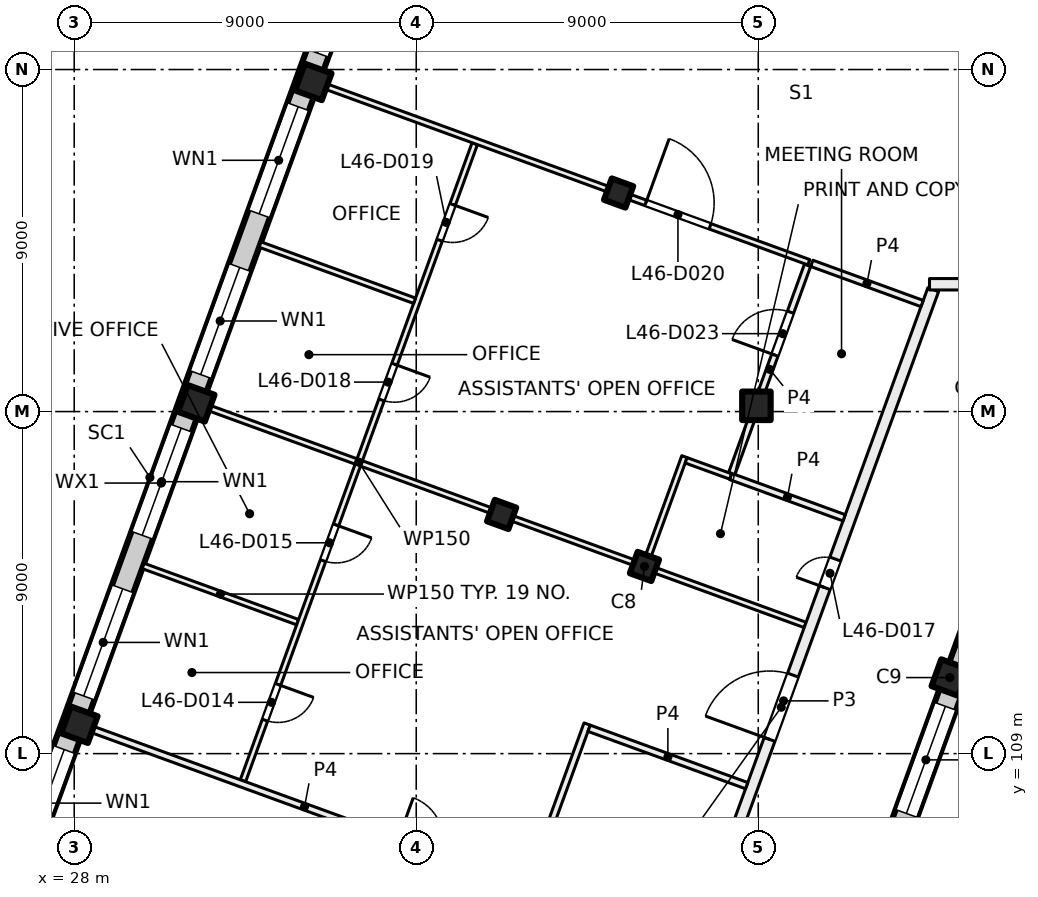
"""IFC4 building model, lengths in metres.
Left out: names, types, materials, properties, quantities, classifications, styles, units other than length and angle.
Written with IfcOpenShell. Run it as: python <this file> out.ifc"""

import sys

from ifc_helpers import new_model, si_unit, direction, frame, frame_2d, origin, origin_2d, place, context, subcontext, project, spatial, rectangle, extrude, element, fill, save


model = new_model("IFC4")
c1 = context("Model", 3, precision=1e-05, world=origin(), true_north=direction((0.0, 1.0)))
c2 = subcontext(c1, "Body", "Model", "MODEL_VIEW")
j1 = project(units=[si_unit("LENGTHUNIT", "METRE"), si_unit("PLANEANGLEUNIT", "RADIAN")], contexts=[c1])
p1 = place(None, origin())
s1 = spatial("IfcSite", under=j1, at=p1, CompositionType="ELEMENT")
p2 = place(p1, origin())
s2 = spatial("IfcBuilding", under=s1, at=p2, CompositionType="ELEMENT")
p3 = place(p2, frame((0.0, 0.0, 196.0)))
s3 = spatial("IfcBuildingStorey", under=s2, at=p3, CompositionType="ELEMENT", Elevation=196.0)
p4 = place(p3, frame((45.952, 118.152, 0.0), z_axis=(0.0, 0.0, 1.0), x_axis=(1.0, 0.0, 0.0)))
e1 = element("IfcColumn", 1, at=p4, inside=s3, PredefinedType="COLUMN", context=c2, shape_type="SweptSolid", body=[
    extrude(rectangle(XDim=0.75, YDim=0.75, at=origin_2d()), origin(), (0.0, 0.0, 1.0), 4.0),
])
for number, where, z_axis, x_axis in (
    (2, (43.006, 113.925, 0.0), (0.0, 0.0, 1.0), (-0.342, -0.94, 0.0)),
    (3, (42.325, 123.751, 0.0), (0.0, 0.0, 1.0), (-0.342, -0.94, 0.0)),
    (4, (39.247, 115.293, 0.0), (0.0, 0.0, 1.0), (-0.342, -0.94, 0.0)),
):
    element("IfcColumn", number, at=place(p3, frame(where, z_axis=z_axis, x_axis=x_axis)), inside=s3, PredefinedType="COLUMN", context=c2, shape_type="SweptSolid", body=[
        extrude(rectangle(XDim=0.6, YDim=0.6, at=origin_2d()), origin(), (0.0, 0.0, 1.0), 4.0),
    ])
for number, where, z_axis, x_axis in (
    (5, (51.04, 111.001, 0.0), (0.0, 0.0, 1.0), (-0.342, -0.94, 0.0)),
    (6, (34.291, 126.675, 0.0), (0.0, 0.0, 1.0), (-0.342, -0.94, 0.0)),
    (7, (31.212, 118.218, 0.0), (0.0, 0.0, 1.0), (-0.342, -0.94, 0.0)),
    (8, (28.134, 109.76, 0.0), (0.0, 0.0, 1.0), (-0.342, -0.94, 0.0)),
):
    element("IfcColumn", number, at=place(p3, frame(where, z_axis=z_axis, x_axis=x_axis)), inside=s3, PredefinedType="COLUMN", context=c2, shape_type="SweptSolid", body=[
        extrude(rectangle(XDim=0.75, YDim=0.75, at=origin_2d()), origin(), (0.0, 0.0, 1.0), 4.0),
    ])
p5 = place(p3, frame((52.212, 113.783, 0.0), z_axis=(0.0, 0.0, 1.0), x_axis=(-0.34202521188, -0.939690775968, 0.0)))
e9 = element("IfcWall", 9, at=p5, inside=s3, PredefinedType="SOLIDWALL", context=c2, shape_type="SweptSolid", body=[
    extrude(rectangle(XDim=21.745, YDim=0.6, at=frame_2d((10.873, 0.0))), origin(), (0.0, 0.0, 1.0), 3.625),
])
p6 = place(p5, frame((3.765, 0.0, 0.9)))
e10 = element("IfcOpeningElement", 10, at=p6, cuts=e9, PredefinedType="OPENING", context=c2, shape_type="SweptSolid", body=[
    extrude(rectangle(XDim=3.0, YDim=2.4, at=frame_2d((1.5, 1.2))), frame((0.0, 0.31, 0.0), z_axis=(0.0, -1.0, 0.0), x_axis=(1.0, 0.0, 0.0)), (0.0, 0.0, 1.0), 0.62),
])
p7 = place(p5, frame((8.265, 0.0, 0.9)))
e11 = element("IfcOpeningElement", 11, at=p7, cuts=e9, PredefinedType="OPENING", context=c2, shape_type="SweptSolid", body=[
    extrude(rectangle(XDim=3.0, YDim=2.4, at=frame_2d((1.5, 1.2))), frame((0.0, 0.31, 0.0), z_axis=(0.0, -1.0, 0.0), x_axis=(1.0, 0.0, 0.0)), (0.0, 0.0, 1.0), 0.62),
])
p8 = place(p5, frame((12.765, 0.0, 0.9)))
e12 = element("IfcOpeningElement", 12, at=p8, cuts=e9, PredefinedType="OPENING", context=c2, shape_type="SweptSolid", body=[
    extrude(rectangle(XDim=3.0, YDim=2.4, at=frame_2d((1.5, 1.2))), frame((0.0, 0.31, 0.0), z_axis=(0.0, -1.0, 0.0), x_axis=(1.0, 0.0, 0.0)), (0.0, 0.0, 1.0), 0.62),
])
p9 = place(p5, frame((17.265, 0.0, 0.9)))
e13 = element("IfcOpeningElement", 13, at=p9, cuts=e9, PredefinedType="OPENING", context=c2, shape_type="SweptSolid", body=[
    extrude(rectangle(XDim=3.0, YDim=2.4, at=frame_2d((1.5, 1.2))), frame((0.0, 0.31, 0.0), z_axis=(0.0, -1.0, 0.0), x_axis=(1.0, 0.0, 0.0)), (0.0, 0.0, 1.0), 0.62),
])
p10 = place(p3, frame((24.666, 100.669, 0.0), z_axis=(0.0, 0.0, 1.0), x_axis=(0.34201964167, 0.939692803373, 0.0)))
e14 = element("IfcWall", 14, at=p10, inside=s3, PredefinedType="SOLIDWALL", context=c2, shape_type="SweptSolid", body=[
    extrude(rectangle(XDim=32.884, YDim=0.6, at=frame_2d((16.442, 0.0))), origin(), (0.0, 0.0, 1.0), 3.625),
])
p11 = place(p10, frame((1.48, 0.0, 0.9)))
e15 = element("IfcOpeningElement", 15, at=p11, cuts=e14, PredefinedType="OPENING", context=c2, shape_type="SweptSolid", body=[
    extrude(rectangle(XDim=3.0, YDim=2.4, at=frame_2d((1.5, 1.2))), frame((0.0, 0.31, 0.0), z_axis=(0.0, -1.0, 0.0), x_axis=(1.0, 0.0, 0.0)), (0.0, 0.0, 1.0), 0.62),
])
p12 = place(p10, frame((5.98, 0.0, 0.9)))
e16 = element("IfcOpeningElement", 16, at=p12, cuts=e14, PredefinedType="OPENING", context=c2, shape_type="SweptSolid", body=[
    extrude(rectangle(XDim=3.0, YDim=2.4, at=frame_2d((1.5, 1.2))), frame((0.0, 0.31, 0.0), z_axis=(0.0, -1.0, 0.0), x_axis=(1.0, 0.0, 0.0)), (0.0, 0.0, 1.0), 0.62),
])
p13 = place(p10, frame((10.48, 0.0, 0.9)))
e17 = element("IfcOpeningElement", 17, at=p13, cuts=e14, PredefinedType="OPENING", context=c2, shape_type="SweptSolid", body=[
    extrude(rectangle(XDim=3.0, YDim=2.4, at=frame_2d((1.5, 1.2))), frame((0.0, 0.31, 0.0), z_axis=(0.0, -1.0, 0.0), x_axis=(1.0, 0.0, 0.0)), (0.0, 0.0, 1.0), 0.62),
])
p14 = place(p10, frame((14.98, 0.0, 0.9)))
e18 = element("IfcOpeningElement", 18, at=p14, cuts=e14, PredefinedType="OPENING", context=c2, shape_type="SweptSolid", body=[
    extrude(rectangle(XDim=3.0, YDim=2.4, at=frame_2d((1.5, 1.2))), frame((0.0, 0.31, 0.0), z_axis=(0.0, -1.0, 0.0), x_axis=(1.0, 0.0, 0.0)), (0.0, 0.0, 1.0), 0.62),
])
p15 = place(p10, frame((19.48, 0.0, 0.9)))
e19 = element("IfcOpeningElement", 19, at=p15, cuts=e14, PredefinedType="OPENING", context=c2, shape_type="SweptSolid", body=[
    extrude(rectangle(XDim=3.0, YDim=2.4, at=frame_2d((1.5, 1.2))), frame((0.0, 0.31, 0.0), z_axis=(0.0, -1.0, 0.0), x_axis=(1.0, 0.0, 0.0)), (0.0, 0.0, 1.0), 0.62),
])
p16 = place(p10, frame((23.98, 0.0, 0.9)))
e20 = element("IfcOpeningElement", 20, at=p16, cuts=e14, PredefinedType="OPENING", context=c2, shape_type="SweptSolid", body=[
    extrude(rectangle(XDim=3.0, YDim=2.4, at=frame_2d((1.5, 1.2))), frame((0.0, 0.31, 0.0), z_axis=(0.0, -1.0, 0.0), x_axis=(1.0, 0.0, 0.0)), (0.0, 0.0, 1.0), 0.62),
])
p17 = place(p10, frame((28.48, 0.0, 0.9)))
e21 = element("IfcOpeningElement", 21, at=p17, cuts=e14, PredefinedType="OPENING", context=c2, shape_type="SweptSolid", body=[
    extrude(rectangle(XDim=3.0, YDim=2.4, at=frame_2d((1.5, 1.2))), frame((0.0, 0.31, 0.0), z_axis=(0.0, -1.0, 0.0), x_axis=(1.0, 0.0, 0.0)), (0.0, 0.0, 1.0), 0.62),
])
p18 = place(p3, frame((29.814, 113.938, 0.0), z_axis=(0.0, 0.0, 1.0), x_axis=(0.93973078783, -0.341915262023, 0.0)))
e22 = element("IfcWall", 22, at=p18, inside=s3, PredefinedType="PARTITIONING", context=c2, shape_type="SweptSolid", body=[
    extrude(rectangle(XDim=4.326, YDim=0.15, at=frame_2d((2.163, 0.0))), origin(), (0.0, 0.0, 1.0), 3.625),
])
p19 = place(p3, frame((31.353, 118.166, 0.0), z_axis=(0.0, 0.0, 1.0), x_axis=(0.939695108427, -0.342013308511, 0.0)))
e23 = element("IfcWall", 23, at=p19, inside=s3, PredefinedType="PARTITIONING", context=c2, shape_type="SweptSolid", body=[
    extrude(rectangle(XDim=16.9, YDim=0.15, at=frame_2d((8.45, 0.0))), origin(), (0.0, 0.0, 1.0), 3.625),
])
p20 = place(p3, frame((38.54, 125.049, 0.0), z_axis=(0.0, 0.0, 1.0), x_axis=(-0.341960632782, -0.939714278719, 0.0)))
e24 = element("IfcWall", 24, at=p20, inside=s3, PredefinedType="PARTITIONING", context=c2, shape_type="SweptSolid", body=[
    extrude(rectangle(XDim=17.839, YDim=0.15, at=frame_2d((8.919, 0.0))), origin(), (0.0, 0.0, 1.0), 3.625),
])
p21 = place(p20, frame((15.142, 0.0, 0.0)))
e25 = element("IfcOpeningElement", 25, at=p21, cuts=e24, PredefinedType="OPENING", context=c2, shape_type="SweptSolid", body=[
    extrude(rectangle(XDim=1.0, YDim=2.1, at=frame_2d((0.5, 1.05))), frame((0.0, 0.085, 0.0), z_axis=(0.0, -1.0, 0.0), x_axis=(1.0, 0.0, 0.0)), (0.0, 0.0, 1.0), 0.17),
])
p22 = place(p20, frame((10.675, 0.0, 0.0)))
e26 = element("IfcOpeningElement", 26, at=p22, cuts=e24, PredefinedType="OPENING", context=c2, shape_type="SweptSolid", body=[
    extrude(rectangle(XDim=1.0, YDim=2.1, at=frame_2d((0.5, 1.05))), frame((0.0, 0.085, 0.0), z_axis=(0.0, -1.0, 0.0), x_axis=(1.0, 0.0, 0.0)), (0.0, 0.0, 1.0), 0.17),
])
p23 = place(p20, frame((6.176, 0.0, 0.0)))
e27 = element("IfcOpeningElement", 27, at=p23, cuts=e24, PredefinedType="OPENING", context=c2, shape_type="SweptSolid", body=[
    extrude(rectangle(XDim=1.0, YDim=2.1, at=frame_2d((0.5, 1.05))), frame((0.0, 0.085, 0.0), z_axis=(0.0, -1.0, 0.0), x_axis=(1.0, 0.0, 0.0)), (0.0, 0.0, 1.0), 0.17),
])
p24 = place(p20, frame((1.703, 0.0, 0.0)))
e28 = element("IfcOpeningElement", 28, at=p24, cuts=e24, PredefinedType="OPENING", context=c2, shape_type="SweptSolid", body=[
    extrude(rectangle(XDim=1.0, YDim=2.1, at=frame_2d((0.5, 1.05))), frame((0.0, 0.085, 0.0), z_axis=(0.0, -1.0, 0.0), x_axis=(1.0, 0.0, 0.0)), (0.0, 0.0, 1.0), 0.17),
])
p25 = place(p3, frame((32.892, 122.395, 0.0), z_axis=(0.0, 0.0, 1.0), x_axis=(0.93973078783, -0.341915262023, 0.0)))
e29 = element("IfcWall", 29, at=p25, inside=s3, PredefinedType="PARTITIONING", context=c2, shape_type="SweptSolid", body=[
    extrude(rectangle(XDim=4.326, YDim=0.15, at=frame_2d((2.163, 0.0))), origin(), (0.0, 0.0, 1.0), 3.625),
])
p26 = place(p3, frame((34.431, 126.624, 0.0), z_axis=(0.0, 0.0, 1.0), x_axis=(0.939689004313, -0.34203007934, 0.0)))
e30 = element("IfcWall", 30, at=p26, inside=s3, PredefinedType="PARTITIONING", context=c2, shape_type="SweptSolid", body=[
    extrude(rectangle(XDim=13.727, YDim=0.15, at=frame_2d((6.864, 0.0))), origin(), (0.0, 0.0, 1.0), 3.625),
])
p27 = place(p26, frame((9.162, 0.0, 0.0)))
e31 = element("IfcOpeningElement", 31, at=p27, cuts=e30, PredefinedType="OPENING", context=c2, shape_type="SweptSolid", body=[
    extrude(rectangle(XDim=1.8, YDim=2.1, at=frame_2d((0.9, 1.05))), frame((0.0, 0.085, 0.0), z_axis=(0.0, -1.0, 0.0), x_axis=(1.0, 0.0, 0.0)), (0.0, 0.0, 1.0), 0.17),
])
p28 = place(p3, frame((38.418, 101.321, 0.0), z_axis=(0.0, 0.0, 1.0), x_axis=(0.342082778631, 0.939669821035, 0.0)))
e32 = element("IfcWall", 32, at=p28, inside=s3, PredefinedType="PARTITIONING", context=c2, shape_type="SweptSolid", body=[
    extrude(rectangle(XDim=9.001, YDim=0.175, at=frame_2d((4.5, 0.0))), origin(), (0.0, 0.0, 1.0), 3.625),
])
p29 = place(p3, frame((28.275, 109.709, 0.0), z_axis=(0.0, 0.0, 1.0), x_axis=(0.939707717516, -0.341978662553, 0.0)))
e33 = element("IfcWall", 33, at=p29, inside=s3, PredefinedType="PARTITIONING", context=c2, shape_type="SweptSolid", body=[
    extrude(rectangle(XDim=12.313, YDim=0.175, at=frame_2d((6.157, 0.0))), origin(), (0.0, 0.0, 1.0), 3.625),
])
p30 = place(p29, frame((8.765, 0.0, 0.0)))
e34 = element("IfcOpeningElement", 34, at=p30, cuts=e33, PredefinedType="OPENING", context=c2, shape_type="SweptSolid", body=[
    extrude(rectangle(XDim=1.2, YDim=2.1, at=frame_2d((0.6, 1.05))), frame((0.0, 0.097, 0.0), z_axis=(0.0, -1.0, 0.0), x_axis=(1.0, 0.0, 0.0)), (0.0, 0.0, 1.0), 0.195),
])
p31 = place(p3, frame((42.728, 99.567, 0.0), z_axis=(0.0, 0.0, 1.0), x_axis=(0.342015412648, 0.939694342598, 0.0)))
e35 = element("IfcWall", 35, at=p31, inside=s3, PredefinedType="PARTITIONING", context=c2, shape_type="SweptSolid", body=[
    extrude(rectangle(XDim=23.031, YDim=0.3, at=frame_2d((11.516, 0.0))), origin(), (0.0, 0.0, 1.0), 3.625),
])
p32 = place(p31, frame((3.987, 0.0, 0.0)))
e36 = element("IfcOpeningElement", 36, at=p32, cuts=e35, PredefinedType="OPENING", context=c2, shape_type="SweptSolid", body=[
    extrude(rectangle(XDim=1.2, YDim=2.1, at=frame_2d((0.6, 1.05))), frame((0.0, 0.16, 0.0), z_axis=(0.0, -1.0, 0.0), x_axis=(1.0, 0.0, 0.0)), (0.0, 0.0, 1.0), 0.32),
])
p33 = place(p31, frame((10.437, 0.0, 0.0)))
e37 = element("IfcOpeningElement", 37, at=p33, cuts=e35, PredefinedType="OPENING", context=c2, shape_type="SweptSolid", body=[
    extrude(rectangle(XDim=1.8, YDim=2.1, at=frame_2d((0.9, 1.05))), frame((0.0, 0.16, 0.0), z_axis=(0.0, -1.0, 0.0), x_axis=(1.0, 0.0, 0.0)), (0.0, 0.0, 1.0), 0.32),
])
p34 = place(p31, frame((14.687, 0.0, 0.0)))
e38 = element("IfcOpeningElement", 38, at=p34, cuts=e35, PredefinedType="OPENING", context=c2, shape_type="SweptSolid", body=[
    extrude(rectangle(XDim=0.8, YDim=2.1, at=frame_2d((0.4, 1.05))), frame((0.0, 0.16, 0.0), z_axis=(0.0, -1.0, 0.0), x_axis=(1.0, 0.0, 0.0)), (0.0, 0.0, 1.0), 0.32),
])
p35 = place(p3, frame((44.058, 116.814, 0.0), z_axis=(0.0, 0.0, 1.0), x_axis=(-0.342063238742, -0.939676934218, 0.0)))
e39 = element("IfcWall", 39, at=p35, inside=s3, PredefinedType="PARTITIONING", context=c2, shape_type="SweptSolid", body=[
    extrude(rectangle(XDim=3.0, YDim=0.15, at=frame_2d((1.5, 0.0))), origin(), (0.0, 0.0, 1.0), 3.625),
])
p36 = place(p3, frame((45.275, 116.292, 0.0), z_axis=(0.0, 0.0, 1.0), x_axis=(-0.93991332754, 0.341413146661, 0.0)))
e40 = element("IfcWall", 40, at=p36, inside=s3, PredefinedType="PARTITIONING", context=c2, shape_type="SweptSolid", body=[
    extrude(rectangle(XDim=1.248, YDim=0.15, at=frame_2d((0.624, 0.0))), origin(), (0.0, 0.0, 1.0), 3.625),
])
p37 = place(p3, frame((45.275, 116.292, 0.0), z_axis=(0.0, 0.0, 1.0), x_axis=(0.939649736865, -0.342137942956, 0.0)))
e41 = element("IfcWall", 41, at=p37, inside=s3, PredefinedType="PARTITIONING", context=c2, shape_type="SweptSolid", body=[
    extrude(rectangle(XDim=3.177, YDim=0.175, at=frame_2d((1.588, 0.0))), origin(), (0.0, 0.0, 1.0), 3.625),
])
p38 = place(p3, frame((45.695, 108.157, 0.0), z_axis=(0.0, 0.0, 1.0), x_axis=(-0.939620446327, 0.342218375959, 0.0)))
e42 = element("IfcWall", 42, at=p38, inside=s3, PredefinedType="PARTITIONING", context=c2, shape_type="SweptSolid", body=[
    extrude(rectangle(XDim=4.412, YDim=0.175, at=frame_2d((2.206, 0.0))), origin(), (0.0, 0.0, 1.0), 3.625),
])
p39 = place(p3, frame((45.305, 116.374, 0.0), z_axis=(0.0, 0.0, 1.0), x_axis=(0.341998803079, 0.939700387726, 0.0)))
e43 = element("IfcWall", 43, at=p39, inside=s3, PredefinedType="PARTITIONING", context=c2, shape_type="SweptSolid", body=[
    extrude(rectangle(XDim=5.825, YDim=0.175, at=frame_2d((2.913, 0.0))), origin(), (0.0, 0.0, 1.0), 3.625),
])
p40 = place(p39, frame((3.312, 0.0, 0.0)))
e44 = element("IfcOpeningElement", 44, at=p40, cuts=e43, PredefinedType="OPENING", context=c2, shape_type="SweptSolid", body=[
    extrude(rectangle(XDim=1.2, YDim=2.1, at=frame_2d((0.6, 1.05))), frame((0.0, 0.097, 0.0), z_axis=(0.0, -1.0, 0.0), x_axis=(1.0, 0.0, 0.0)), (0.0, 0.0, 1.0), 0.195),
])
p41 = place(p3, frame((50.312, 120.843, 0.0), z_axis=(0.0, 0.0, 1.0), x_axis=(-0.939666459913, 0.342092011182, 0.0)))
e45 = element("IfcWall", 45, at=p41, inside=s3, PredefinedType="PARTITIONING", context=c2, shape_type="SweptSolid", body=[
    extrude(rectangle(XDim=3.089, YDim=0.175, at=frame_2d((1.545, 0.0))), origin(), (0.0, 0.0, 1.0), 3.625),
])
p42 = place(p3, frame((50.506, 121.35, 0.0), z_axis=(0.0, 0.0, 1.0), x_axis=(1.0, 0.0, 0.0)))
e46 = element("IfcWall", 46, at=p42, inside=s3, PredefinedType="PARTITIONING", context=c2, shape_type="SweptSolid", body=[
    extrude(rectangle(XDim=35.319, YDim=0.3, at=frame_2d((17.659, 0.0))), origin(), (0.0, 0.0, 1.0), 3.625),
])
p43 = place(p42, frame((21.244, 0.0, 0.0)))
e47 = element("IfcOpeningElement", 47, at=p43, cuts=e46, PredefinedType="OPENING", context=c2, shape_type="SweptSolid", body=[
    extrude(rectangle(XDim=1.0, YDim=2.1, at=frame_2d((0.5, 1.05))), frame((0.0, 0.16, 0.0), z_axis=(0.0, -1.0, 0.0), x_axis=(1.0, 0.0, 0.0)), (0.0, 0.0, 1.0), 0.32),
])
p44 = place(p42, frame((29.844, 0.0, 0.0)))
e48 = element("IfcOpeningElement", 48, at=p44, cuts=e46, PredefinedType="OPENING", context=c2, shape_type="SweptSolid", body=[
    extrude(rectangle(XDim=1.8, YDim=2.1, at=frame_2d((0.9, 1.05))), frame((0.0, 0.16, 0.0), z_axis=(0.0, -1.0, 0.0), x_axis=(1.0, 0.0, 0.0)), (0.0, 0.0, 1.0), 0.32),
])
p45 = place(p42, frame((9.594, 0.0, 0.0)))
e49 = element("IfcOpeningElement", 49, at=p45, cuts=e46, PredefinedType="OPENING", context=c2, shape_type="SweptSolid", body=[
    extrude(rectangle(XDim=1.8, YDim=2.1, at=frame_2d((0.9, 1.05))), frame((0.0, 0.16, 0.0), z_axis=(0.0, -1.0, 0.0), x_axis=(1.0, 0.0, 0.0)), (0.0, 0.0, 1.0), 0.32),
])
p46 = place(p42, frame((1.047, 0.0, 0.0)))
e50 = element("IfcOpeningElement", 50, at=p46, cuts=e46, PredefinedType="OPENING", context=c2, shape_type="SweptSolid", body=[
    extrude(rectangle(XDim=1.8, YDim=2.1, at=frame_2d((0.9, 1.05))), frame((0.0, 0.16, 0.0), z_axis=(0.0, -1.0, 0.0), x_axis=(1.0, 0.0, 0.0)), (0.0, 0.0, 1.0), 0.32),
])
p47 = place(p6, origin())
e51 = element("IfcWindow", 51, at=p47, inside=s3, PartitioningType="SINGLE_PANEL", PredefinedType="WINDOW", context=c2, shape_type="SweptSolid", body=[
    extrude(rectangle(XDim=3.0, YDim=2.4, at=frame_2d((1.5, 1.2))), frame((0.0, 0.03, 0.0), z_axis=(0.0, -1.0, 0.0), x_axis=(1.0, 0.0, 0.0)), (0.0, 0.0, 1.0), 0.06),
])
fill(e10, e51)
p48 = place(p12, origin())
e52 = element("IfcWindow", 52, at=p48, inside=s3, PartitioningType="SINGLE_PANEL", PredefinedType="WINDOW", context=c2, shape_type="SweptSolid", body=[
    extrude(rectangle(XDim=3.0, YDim=2.4, at=frame_2d((1.5, 1.2))), frame((0.0, 0.03, 0.0), z_axis=(0.0, -1.0, 0.0), x_axis=(1.0, 0.0, 0.0)), (0.0, 0.0, 1.0), 0.06),
])
fill(e16, e52)
p49 = place(p13, origin())
e53 = element("IfcWindow", 53, at=p49, inside=s3, PartitioningType="SINGLE_PANEL", PredefinedType="WINDOW", context=c2, shape_type="SweptSolid", body=[
    extrude(rectangle(XDim=3.0, YDim=2.4, at=frame_2d((1.5, 1.2))), frame((0.0, 0.03, 0.0), z_axis=(0.0, -1.0, 0.0), x_axis=(1.0, 0.0, 0.0)), (0.0, 0.0, 1.0), 0.06),
])
fill(e17, e53)
p50 = place(p14, origin())
e54 = element("IfcWindow", 54, at=p50, inside=s3, PartitioningType="SINGLE_PANEL", PredefinedType="WINDOW", context=c2, shape_type="SweptSolid", body=[
    extrude(rectangle(XDim=3.0, YDim=2.4, at=frame_2d((1.5, 1.2))), frame((0.0, 0.03, 0.0), z_axis=(0.0, -1.0, 0.0), x_axis=(1.0, 0.0, 0.0)), (0.0, 0.0, 1.0), 0.06),
])
fill(e18, e54)
p51 = place(p15, origin())
e55 = element("IfcWindow", 55, at=p51, inside=s3, PartitioningType="SINGLE_PANEL", PredefinedType="WINDOW", context=c2, shape_type="SweptSolid", body=[
    extrude(rectangle(XDim=3.0, YDim=2.4, at=frame_2d((1.5, 1.2))), frame((0.0, 0.03, 0.0), z_axis=(0.0, -1.0, 0.0), x_axis=(1.0, 0.0, 0.0)), (0.0, 0.0, 1.0), 0.06),
])
fill(e19, e55)
p52 = place(p16, origin())
e56 = element("IfcWindow", 56, at=p52, inside=s3, PartitioningType="SINGLE_PANEL", PredefinedType="WINDOW", context=c2, shape_type="SweptSolid", body=[
    extrude(rectangle(XDim=3.0, YDim=2.4, at=frame_2d((1.5, 1.2))), frame((0.0, 0.03, 0.0), z_axis=(0.0, -1.0, 0.0), x_axis=(1.0, 0.0, 0.0)), (0.0, 0.0, 1.0), 0.06),
])
fill(e20, e56)
p53 = place(p17, origin())
e57 = element("IfcWindow", 57, at=p53, inside=s3, PartitioningType="SINGLE_PANEL", PredefinedType="WINDOW", context=c2, shape_type="SweptSolid", body=[
    extrude(rectangle(XDim=3.0, YDim=2.4, at=frame_2d((1.5, 1.2))), frame((0.0, 0.03, 0.0), z_axis=(0.0, -1.0, 0.0), x_axis=(1.0, 0.0, 0.0)), (0.0, 0.0, 1.0), 0.06),
])
fill(e21, e57)
p54 = place(p21, origin())
e58 = element("IfcDoor", 58, at=p54, inside=s3, OperationType="SINGLE_SWING_LEFT", PredefinedType="DOOR", context=c2, shape_type="SweptSolid", body=[
    extrude(rectangle(XDim=1.0, YDim=2.1, at=frame_2d((0.5, 1.05))), frame((0.0, 0.025, 0.0), z_axis=(0.0, -1.0, 0.0), x_axis=(1.0, 0.0, 0.0)), (0.0, 0.0, 1.0), 0.05),
])
fill(e25, e58)
p55 = place(p22, origin())
e59 = element("IfcDoor", 59, at=p55, inside=s3, OperationType="SINGLE_SWING_LEFT", PredefinedType="DOOR", context=c2, shape_type="SweptSolid", body=[
    extrude(rectangle(XDim=1.0, YDim=2.1, at=frame_2d((0.5, 1.05))), frame((0.0, 0.025, 0.0), z_axis=(0.0, -1.0, 0.0), x_axis=(1.0, 0.0, 0.0)), (0.0, 0.0, 1.0), 0.05),
])
fill(e26, e59)
p56 = place(p33, origin())
e60 = element("IfcDoor", 60, at=p56, inside=s3, OperationType="DOUBLE_DOOR_SINGLE_SWING", PredefinedType="DOOR", context=c2, shape_type="SweptSolid", body=[
    extrude(rectangle(XDim=1.8, YDim=2.1, at=frame_2d((0.9, 1.05))), frame((0.0, 0.025, 0.0), z_axis=(0.0, -1.0, 0.0), x_axis=(1.0, 0.0, 0.0)), (0.0, 0.0, 1.0), 0.05),
])
fill(e37, e60)
p57 = place(p34, origin())
e61 = element("IfcDoor", 61, at=p57, inside=s3, OperationType="SINGLE_SWING_LEFT", PredefinedType="DOOR", context=c2, shape_type="SweptSolid", body=[
    extrude(rectangle(XDim=0.8, YDim=2.1, at=frame_2d((0.4, 1.05))), frame((0.0, 0.025, 0.0), z_axis=(0.0, -1.0, 0.0), x_axis=(1.0, 0.0, 0.0)), (0.0, 0.0, 1.0), 0.05),
])
fill(e38, e61)
p58 = place(p23, origin())
e62 = element("IfcDoor", 62, at=p58, inside=s3, OperationType="SINGLE_SWING_LEFT", PredefinedType="DOOR", context=c2, shape_type="SweptSolid", body=[
    extrude(rectangle(XDim=1.0, YDim=2.1, at=frame_2d((0.5, 1.05))), frame((0.0, 0.025, 0.0), z_axis=(0.0, -1.0, 0.0), x_axis=(1.0, 0.0, 0.0)), (0.0, 0.0, 1.0), 0.05),
])
fill(e27, e62)
p59 = place(p24, origin())
e63 = element("IfcDoor", 63, at=p59, inside=s3, OperationType="SINGLE_SWING_LEFT", PredefinedType="DOOR", context=c2, shape_type="SweptSolid", body=[
    extrude(rectangle(XDim=1.0, YDim=2.1, at=frame_2d((0.5, 1.05))), frame((0.0, 0.025, 0.0), z_axis=(0.0, -1.0, 0.0), x_axis=(1.0, 0.0, 0.0)), (0.0, 0.0, 1.0), 0.05),
])
fill(e28, e63)
p60 = place(p27, origin())
e64 = element("IfcDoor", 64, at=p60, inside=s3, OperationType="DOUBLE_DOOR_SINGLE_SWING", PredefinedType="DOOR", context=c2, shape_type="SweptSolid", body=[
    extrude(rectangle(XDim=1.8, YDim=2.1, at=frame_2d((0.9, 1.05))), frame((0.0, 0.025, 0.0), z_axis=(0.0, -1.0, 0.0), x_axis=(1.0, 0.0, 0.0)), (0.0, 0.0, 1.0), 0.05),
])
fill(e31, e64)
p61 = place(p40, origin())
e65 = element("IfcDoor", 65, at=p61, inside=s3, OperationType="DOUBLE_DOOR_SINGLE_SWING", PredefinedType="DOOR", context=c2, shape_type="SweptSolid", body=[
    extrude(rectangle(XDim=1.2, YDim=2.1, at=frame_2d((0.6, 1.05))), frame((0.0, 0.025, 0.0), z_axis=(0.0, -1.0, 0.0), x_axis=(1.0, 0.0, 0.0)), (0.0, 0.0, 1.0), 0.05),
])
fill(e44, e65)
save(model, sys.argv[1])
